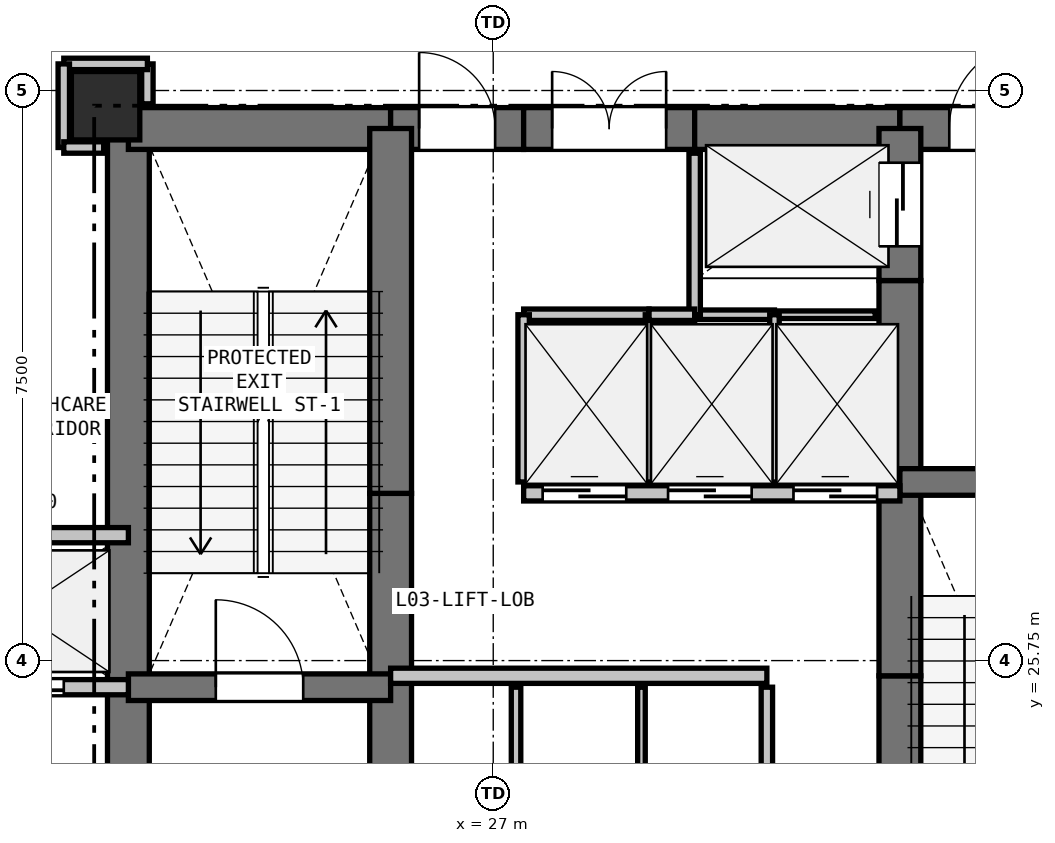
"""IFC4 building model, lengths in metres.
Left out: names, types, materials, properties, quantities, classifications, styles, units other than length and angle.
Written with IfcOpenShell. Run it as: python <this file> out.ifc"""

import sys

from ifc_helpers import new_model, si_unit, direction, frame, frame_2d, origin, origin_2d, place, context, subcontext, project, spatial, rectangle, extrude, element, fill, save


model = new_model("IFC4")
c1 = context("Model", 3, precision=1e-05, world=origin(), true_north=direction((0.0, 1.0)))
c2 = subcontext(c1, "Body", "Model", "MODEL_VIEW")
j1 = project(units=[si_unit("LENGTHUNIT", "METRE"), si_unit("PLANEANGLEUNIT", "RADIAN")], contexts=[c1])
p1 = place(None, origin())
s1 = spatial("IfcSite", under=j1, at=p1, CompositionType="ELEMENT")
p2 = place(p1, origin())
s2 = spatial("IfcBuilding", under=s1, at=p2, CompositionType="ELEMENT")
p3 = place(p2, frame((0.0, 0.0, 14.4)))
s3 = spatial("IfcBuildingStorey", under=s2, at=p3, CompositionType="ELEMENT", Elevation=14.4)
p4 = place(p3, frame((21.9, 33.05, 0.0), z_axis=(0.0, 0.0, 1.0), x_axis=(1.0, 0.0, 0.0)))
e1 = element("IfcColumn", 1, at=p4, inside=s3, PredefinedType="COLUMN", context=c2, shape_type="SweptSolid", body=[
    extrude(rectangle(XDim=0.9, YDim=0.9, at=origin_2d()), origin(), (0.0, 0.0, 1.0), 4.8),
])
p5 = place(p3, frame((22.2, 20.75, 0.0), z_axis=(0.0, 0.0, 1.0), x_axis=(0.0, 1.0, 0.0)))
e2 = element("IfcWall", 2, at=p5, inside=s3, PredefinedType="SHEAR", context=c2, shape_type="SweptSolid", body=[
    extrude(rectangle(XDim=4.65, YDim=0.55, at=frame_2d((2.325, 0.0))), origin(), (0.0, 0.0, 1.0), 4.52),
])
p6 = place(p3, frame((22.2, 25.4, 0.0), z_axis=(0.0, 0.0, 1.0), x_axis=(0.0, 1.0, 0.0)))
e3 = element("IfcWall", 3, at=p6, inside=s3, PredefinedType="SHEAR", context=c2, shape_type="SweptSolid", body=[
    extrude(rectangle(XDim=7.35, YDim=0.55, at=frame_2d((3.675, 0.0))), origin(), (0.0, 0.0, 1.0), 4.52),
])
p7 = place(p3, frame((22.2, 32.75, 0.0), z_axis=(0.0, 0.0, 1.0), x_axis=(1.0, 0.0, 0.0)))
e4 = element("IfcWall", 4, at=p7, inside=s3, PredefinedType="SHEAR", context=c2, shape_type="SweptSolid", body=[
    extrude(rectangle(XDim=3.45, YDim=0.55, at=frame_2d((1.725, 0.0))), origin(), (0.0, 0.0, 1.0), 4.52),
])
p8 = place(p3, frame((25.65, 32.75, 0.0), z_axis=(0.0, 0.0, 1.0), x_axis=(1.0, 0.0, 0.0)))
e5 = element("IfcWall", 5, at=p8, inside=s3, PredefinedType="SHEAR", context=c2, shape_type="SweptSolid", body=[
    extrude(rectangle(XDim=1.75, YDim=0.55, at=frame_2d((0.875, 0.0))), origin(), (0.0, 0.0, 1.0), 4.52),
])
p9 = place(p8, frame((0.375, 0.0, 0.0)))
e6 = element("IfcOpeningElement", 6, at=p9, cuts=e5, PredefinedType="OPENING", context=c2, shape_type="SweptSolid", body=[
    extrude(rectangle(XDim=1.0, YDim=2.15, at=frame_2d((0.5, 1.075))), frame((0.0, 0.285, 0.0), z_axis=(0.0, -1.0, 0.0), x_axis=(1.0, 0.0, 0.0)), (0.0, 0.0, 1.0), 0.57),
])
p10 = place(p3, frame((27.4, 32.75, 0.0), z_axis=(0.0, 0.0, 1.0), x_axis=(1.0, 0.0, 0.0)))
e7 = element("IfcWall", 7, at=p10, inside=s3, PredefinedType="SHEAR", context=c2, shape_type="SweptSolid", body=[
    extrude(rectangle(XDim=2.25, YDim=0.55, at=frame_2d((1.125, 0.0))), origin(), (0.0, 0.0, 1.0), 4.52),
])
p11 = place(p10, frame((0.375, 0.0, 0.0)))
e8 = element("IfcOpeningElement", 8, at=p11, cuts=e7, PredefinedType="OPENING", context=c2, shape_type="SweptSolid", body=[
    extrude(rectangle(XDim=1.5, YDim=2.2, at=frame_2d((0.75, 1.1))), frame((0.0, 0.285, 0.0), z_axis=(0.0, -1.0, 0.0), x_axis=(1.0, 0.0, 0.0)), (0.0, 0.0, 1.0), 0.57),
])
p12 = place(p3, frame((29.65, 32.75, 0.0), z_axis=(0.0, 0.0, 1.0), x_axis=(1.0, 0.0, 0.0)))
e9 = element("IfcWall", 9, at=p12, inside=s3, PredefinedType="SHEAR", context=c2, shape_type="SweptSolid", body=[
    extrude(rectangle(XDim=2.7, YDim=0.55, at=frame_2d((1.35, 0.0))), origin(), (0.0, 0.0, 1.0), 4.52),
])
p13 = place(p3, frame((32.35, 32.75, 0.0), z_axis=(0.0, 0.0, 1.0), x_axis=(1.0, 0.0, 0.0)))
e10 = element("IfcWall", 10, at=p13, inside=s3, PredefinedType="SHEAR", context=c2, shape_type="SweptSolid", body=[
    extrude(rectangle(XDim=3.45, YDim=0.55, at=frame_2d((1.725, 0.0))), origin(), (0.0, 0.0, 1.0), 4.52),
])
p14 = place(p13, frame((0.65, 0.0, 0.0)))
e11 = element("IfcOpeningElement", 11, at=p14, cuts=e10, PredefinedType="OPENING", context=c2, shape_type="SweptSolid", body=[
    extrude(rectangle(XDim=1.15, YDim=2.15, at=frame_2d((0.575, 1.075))), frame((0.0, 0.285, 0.0), z_axis=(0.0, -1.0, 0.0), x_axis=(1.0, 0.0, 0.0)), (0.0, 0.0, 1.0), 0.57),
])
p15 = place(p3, frame((25.65, 22.75, 0.0), z_axis=(0.0, 0.0, 1.0), x_axis=(0.0, 1.0, 0.0)))
e12 = element("IfcWall", 12, at=p15, inside=s3, PredefinedType="SHEAR", context=c2, shape_type="SweptSolid", body=[
    extrude(rectangle(XDim=2.8, YDim=0.55, at=frame_2d((1.4, 0.0))), origin(), (0.0, 0.0, 1.0), 4.52),
])
p16 = place(p3, frame((25.65, 25.55, 0.0), z_axis=(0.0, 0.0, 1.0), x_axis=(0.0, 1.0, 0.0)))
e13 = element("IfcWall", 13, at=p16, inside=s3, PredefinedType="SHEAR", context=c2, shape_type="SweptSolid", body=[
    extrude(rectangle(XDim=2.4, YDim=0.55, at=frame_2d((1.2, 0.0))), origin(), (0.0, 0.0, 1.0), 4.52),
])
for number, where, z_axis, x_axis in (
    (14, (25.65, 27.95, 0.0), (0.0, 0.0, 1.0), (0.0, 1.0, 0.0)),
    (15, (32.35, 20.75, 0.0), (0.0, 0.0, 1.0), (0.0, 1.0, 0.0)),
):
    element("IfcWall", number, at=place(p3, frame(where, z_axis=z_axis, x_axis=x_axis)), inside=s3, PredefinedType="SHEAR", context=c2, shape_type="SweptSolid", body=[
        extrude(rectangle(XDim=4.8, YDim=0.55, at=frame_2d((2.4, 0.0))), origin(), (0.0, 0.0, 1.0), 4.52),
    ])
p17 = place(p3, frame((32.35, 25.55, 0.0), z_axis=(0.0, 0.0, 1.0), x_axis=(0.0, 1.0, 0.0)))
e16 = element("IfcWall", 16, at=p17, inside=s3, PredefinedType="SHEAR", context=c2, shape_type="SweptSolid", body=[
    extrude(rectangle(XDim=2.4, YDim=0.55, at=frame_2d((1.2, 0.0))), origin(), (0.0, 0.0, 1.0), 4.52),
])
p18 = place(p3, frame((32.35, 27.95, 0.0), z_axis=(0.0, 0.0, 1.0), x_axis=(0.0, 1.0, 0.0)))
e17 = element("IfcWall", 17, at=p18, inside=s3, PredefinedType="SHEAR", context=c2, shape_type="SweptSolid", body=[
    extrude(rectangle(XDim=2.8, YDim=0.55, at=frame_2d((1.4, 0.0))), origin(), (0.0, 0.0, 1.0), 4.52),
])
p19 = place(p3, frame((32.35, 30.75, 0.0), z_axis=(0.0, 0.0, 1.0), x_axis=(0.0, 1.0, 0.0)))
e18 = element("IfcWall", 18, at=p19, inside=s3, PredefinedType="SHEAR", context=c2, shape_type="SweptSolid", body=[
    extrude(rectangle(XDim=2.0, YDim=0.55, at=frame_2d((1.0, 0.0))), origin(), (0.0, 0.0, 1.0), 4.52),
])
p20 = place(p19, frame((0.45, 0.0, 0.0)))
e19 = element("IfcOpeningElement", 19, at=p20, cuts=e18, PredefinedType="OPENING", context=c2, shape_type="SweptSolid", body=[
    extrude(rectangle(XDim=1.1, YDim=2.15, at=frame_2d((0.55, 1.075))), frame((0.0, 0.285, 0.0), z_axis=(0.0, -1.0, 0.0), x_axis=(1.0, 0.0, 0.0)), (0.0, 0.0, 1.0), 0.57),
])
p21 = place(p3, frame((22.2, 25.4, 0.0), z_axis=(0.0, 0.0, 1.0), x_axis=(1.0, 0.0, 0.0)))
e20 = element("IfcWall", 20, at=p21, inside=s3, PredefinedType="SHEAR", context=c2, shape_type="SweptSolid", body=[
    extrude(rectangle(XDim=3.45, YDim=0.35, at=frame_2d((1.725, 0.0))), origin(), (0.0, 0.0, 1.0), 4.52),
])
p22 = place(p21, frame((1.15, 0.0, 0.0)))
e21 = element("IfcOpeningElement", 21, at=p22, cuts=e20, PredefinedType="OPENING", context=c2, shape_type="SweptSolid", body=[
    extrude(rectangle(XDim=1.15, YDim=2.15, at=frame_2d((0.575, 1.075))), frame((0.0, 0.185, 0.0), z_axis=(0.0, -1.0, 0.0), x_axis=(1.0, 0.0, 0.0)), (0.0, 0.0, 1.0), 0.37),
])
p23 = place(p3, frame((32.35, 28.1, 0.0), z_axis=(0.0, 0.0, 1.0), x_axis=(1.0, 0.0, 0.0)))
e22 = element("IfcWall", 22, at=p23, inside=s3, PredefinedType="SHEAR", context=c2, shape_type="SweptSolid", body=[
    extrude(rectangle(XDim=3.45, YDim=0.35, at=frame_2d((1.725, 0.0))), origin(), (0.0, 0.0, 1.0), 4.52),
])
p24 = place(p23, frame((1.15, 0.0, 0.0)))
e23 = element("IfcOpeningElement", 23, at=p24, cuts=e22, PredefinedType="OPENING", context=c2, shape_type="SweptSolid", body=[
    extrude(rectangle(XDim=1.15, YDim=2.15, at=frame_2d((0.575, 1.075))), frame((0.0, 0.185, 0.0), z_axis=(0.0, -1.0, 0.0), x_axis=(1.0, 0.0, 0.0)), (0.0, 0.0, 1.0), 0.37),
])
p25 = place(p3, frame((25.65, 25.55, 0.0), z_axis=(0.0, 0.0, 1.0), x_axis=(1.0, 0.0, 0.0)))
e24 = element("IfcWall", 24, at=p25, inside=s3, PredefinedType="PARTITIONING", context=c2, shape_type="SweptSolid", body=[
    extrude(rectangle(XDim=4.95, YDim=0.2, at=frame_2d((2.475, 0.0))), origin(), (0.0, 0.0, 1.0), 4.52),
])
p26 = place(p3, frame((27.4, 27.95, 0.0), z_axis=(0.0, 0.0, 1.0), x_axis=(1.0, 0.0, 0.0)))
e25 = element("IfcWall", 25, at=p26, inside=s3, PredefinedType="PARTITIONING", context=c2, shape_type="SweptSolid", body=[
    extrude(rectangle(XDim=4.95, YDim=0.2, at=frame_2d((2.475, 0.0))), origin(), (0.0, 0.0, 1.0), 4.52),
])
p27 = place(p26, frame((0.25, 0.0, 0.0)))
e26 = element("IfcOpeningElement", 26, at=p27, cuts=e25, PredefinedType="OPENING", context=c2, shape_type="SweptSolid", body=[
    extrude(rectangle(XDim=1.1, YDim=2.15, at=frame_2d((0.55, 1.075))), frame((0.0, 0.11, 0.0), z_axis=(0.0, -1.0, 0.0), x_axis=(1.0, 0.0, 0.0)), (0.0, 0.0, 1.0), 0.22),
])
p28 = place(p26, frame((1.9, 0.0, 0.0)))
e27 = element("IfcOpeningElement", 27, at=p28, cuts=e25, PredefinedType="OPENING", context=c2, shape_type="SweptSolid", body=[
    extrude(rectangle(XDim=1.1, YDim=2.15, at=frame_2d((0.55, 1.075))), frame((0.0, 0.11, 0.0), z_axis=(0.0, -1.0, 0.0), x_axis=(1.0, 0.0, 0.0)), (0.0, 0.0, 1.0), 0.22),
])
p29 = place(p26, frame((3.55, 0.0, 0.0)))
e28 = element("IfcOpeningElement", 28, at=p29, cuts=e25, PredefinedType="OPENING", context=c2, shape_type="SweptSolid", body=[
    extrude(rectangle(XDim=1.1, YDim=2.15, at=frame_2d((0.55, 1.075))), frame((0.0, 0.11, 0.0), z_axis=(0.0, -1.0, 0.0), x_axis=(1.0, 0.0, 0.0)), (0.0, 0.0, 1.0), 0.22),
])
p30 = place(p3, frame((19.4, 27.4, 0.0), z_axis=(0.0, 0.0, 1.0), x_axis=(1.0, 0.0, 0.0)))
e29 = element("IfcWall", 29, at=p30, inside=s3, PredefinedType="PARTITIONING", context=c2, shape_type="SweptSolid", body=[
    extrude(rectangle(XDim=2.8, YDim=0.2, at=frame_2d((1.4, 0.0))), origin(), (0.0, 0.0, 1.0), 3.969),
])
p31 = place(p3, frame((22.2, 25.4, 0.0), z_axis=(0.0, 0.0, 1.0), x_axis=(-1.0, 0.0, 0.0)))
e30 = element("IfcWall", 30, at=p31, inside=s3, PredefinedType="PARTITIONING", context=c2, shape_type="SweptSolid", body=[
    extrude(rectangle(XDim=2.8, YDim=0.2, at=frame_2d((1.4, 0.0))), origin(), (0.0, 0.0, 1.0), 3.969),
])
p32 = place(p31, frame((0.85, 0.0, 0.0)))
e31 = element("IfcOpeningElement", 31, at=p32, cuts=e30, PredefinedType="OPENING", context=c2, shape_type="SweptSolid", body=[
    extrude(rectangle(XDim=1.3, YDim=2.2, at=frame_2d((0.65, 1.1))), frame((0.0, 0.11, 0.0), z_axis=(0.0, -1.0, 0.0), x_axis=(1.0, 0.0, 0.0)), (0.0, 0.0, 1.0), 0.22),
])
p33 = place(p3, frame((32.025, 30.3, 0.0), z_axis=(0.0, 0.0, 1.0), x_axis=(-1.0, 0.0, 0.0)))
e32 = element("IfcWall", 32, at=p33, inside=s3, PredefinedType="PARTITIONING", context=c2, shape_type="SweptSolid", body=[
    extrude(rectangle(XDim=1.325, YDim=0.1, at=frame_2d((0.663, 0.0))), origin(), (0.0, 0.0, 1.0), 4.52),
])
p34 = place(p3, frame((30.7, 30.3, 0.0), z_axis=(0.0, 0.0, 1.0), x_axis=(-1.0, 0.0, 0.0)))
e33 = element("IfcWall", 33, at=p34, inside=s3, PredefinedType="PARTITIONING", context=c2, shape_type="SweptSolid", body=[
    extrude(rectangle(XDim=1.05, YDim=0.125, at=frame_2d((0.525, 0.0))), origin(), (0.0, 0.0, 1.0), 4.52),
])
p35 = place(p3, frame((29.65, 30.3, 0.0), z_axis=(0.0, 0.0, 1.0), x_axis=(0.0, 1.0, 0.0)))
e34 = element("IfcWall", 34, at=p35, inside=s3, PredefinedType="PARTITIONING", context=c2, shape_type="SweptSolid", body=[
    extrude(rectangle(XDim=2.125, YDim=0.15, at=frame_2d((1.062, 0.0))), origin(), (0.0, 0.0, 1.0), 4.52),
])
p36 = place(p3, frame((27.3, 25.4, 0.0), z_axis=(0.0, 0.0, 1.0), x_axis=(0.0, -1.0, 0.0)))
e35 = element("IfcWall", 35, at=p36, inside=s3, PredefinedType="PARTITIONING", context=c2, shape_type="SweptSolid", body=[
    extrude(rectangle(XDim=2.2, YDim=0.125, at=frame_2d((1.1, 0.0))), origin(), (0.0, 0.0, 1.0), 4.52),
])
p37 = place(p3, frame((28.95, 25.4, 0.0), z_axis=(0.0, 0.0, 1.0), x_axis=(0.0, -1.0, 0.0)))
e36 = element("IfcWall", 36, at=p37, inside=s3, PredefinedType="PARTITIONING", context=c2, shape_type="SweptSolid", body=[
    extrude(rectangle(XDim=2.2, YDim=0.1, at=frame_2d((1.1, 0.0))), origin(), (0.0, 0.0, 1.0), 4.52),
])
p38 = place(p3, frame((30.6, 25.4, 0.0), z_axis=(0.0, 0.0, 1.0), x_axis=(0.0, -1.0, 0.0)))
e37 = element("IfcWall", 37, at=p38, inside=s3, PredefinedType="PARTITIONING", context=c2, shape_type="SweptSolid", body=[
    extrude(rectangle(XDim=2.2, YDim=0.15, at=frame_2d((1.1, 0.0))), origin(), (0.0, 0.0, 1.0), 4.52),
])
p39 = place(p3, frame((27.4, 30.3, 0.0), z_axis=(0.0, 0.0, 1.0), x_axis=(1.0, 0.0, 0.0)))
e38 = element("IfcWall", 38, at=p39, inside=s3, PredefinedType="PARTITIONING", context=c2, shape_type="SweptSolid", body=[
    extrude(rectangle(XDim=1.65, YDim=0.15, at=frame_2d((0.825, 0.0))), origin(), (0.0, 0.0, 1.0), 4.52),
])
p40 = place(p3, frame((29.05, 30.3, 0.0), z_axis=(0.0, 0.0, 1.0), x_axis=(0.0, -1.0, 0.0)))
e39 = element("IfcWall", 39, at=p40, inside=s3, PredefinedType="PARTITIONING", context=c2, shape_type="SweptSolid", body=[
    extrude(rectangle(XDim=2.2, YDim=0.1, at=frame_2d((1.1, 0.0))), origin(), (0.0, 0.0, 1.0), 4.52),
])
p41 = place(p3, frame((27.4, 28.1, 0.0), z_axis=(0.0, 0.0, 1.0), x_axis=(0.0, 1.0, 0.0)))
e40 = element("IfcWall", 40, at=p41, inside=s3, PredefinedType="PARTITIONING", context=c2, shape_type="SweptSolid", body=[
    extrude(rectangle(XDim=2.2, YDim=0.15, at=frame_2d((1.1, 0.0))), origin(), (0.0, 0.0, 1.0), 4.52),
])
p42 = place(p3, frame((29.05, 30.3, 0.0), z_axis=(0.0, 0.0, 1.0), x_axis=(1.0, 0.0, 0.0)))
e41 = element("IfcWall", 41, at=p42, inside=s3, PredefinedType="PARTITIONING", context=c2, shape_type="SweptSolid", body=[
    extrude(rectangle(XDim=0.6, YDim=0.15, at=frame_2d((0.3, 0.0))), origin(), (0.0, 0.0, 1.0), 4.52),
])
p43 = place(p3, frame((30.7, 30.3, 0.0), z_axis=(0.0, 0.0, 1.0), x_axis=(0.0, -1.0, 0.0)))
e42 = element("IfcWall", 42, at=p43, inside=s3, PredefinedType="PARTITIONING", context=c2, shape_type="SweptSolid", body=[
    extrude(rectangle(XDim=2.2, YDim=0.125, at=frame_2d((1.1, 0.0))), origin(), (0.0, 0.0, 1.0), 4.52),
])
p44 = place(p3, frame((22.45, 33.075, 0.0), z_axis=(0.0, 0.0, 1.0), x_axis=(0.0, 1.0, 0.0)))
e43 = element("IfcWall", 43, at=p44, inside=s3, PredefinedType="PARTITIONING", context=c2, shape_type="SweptSolid", body=[
    extrude(rectangle(XDim=0.525, YDim=0.15, at=frame_2d((0.263, 0.0))), origin(), (0.0, 0.0, 1.0), 3.969),
])
p45 = place(p3, frame((22.45, 33.6, 0.0), z_axis=(0.0, 0.0, 1.0), x_axis=(-1.0, 0.0, 0.0)))
e44 = element("IfcWall", 44, at=p45, inside=s3, PredefinedType="PARTITIONING", context=c2, shape_type="SweptSolid", body=[
    extrude(rectangle(XDim=1.1, YDim=0.15, at=frame_2d((0.55, 0.0))), origin(), (0.0, 0.0, 1.0), 4.52),
])
p46 = place(p3, frame((21.35, 33.6, 0.0), z_axis=(0.0, 0.0, 1.0), x_axis=(0.0, -1.0, 0.0)))
e45 = element("IfcWall", 45, at=p46, inside=s3, PredefinedType="PARTITIONING", context=c2, shape_type="SweptSolid", body=[
    extrude(rectangle(XDim=1.1, YDim=0.15, at=frame_2d((0.55, 0.0))), origin(), (0.0, 0.0, 1.0), 3.818),
])
p47 = place(p3, frame((21.35, 32.5, 0.0), z_axis=(0.0, 0.0, 1.0), x_axis=(1.0, 0.0, 0.0)))
e46 = element("IfcWall", 46, at=p47, inside=s3, PredefinedType="PARTITIONING", context=c2, shape_type="SweptSolid", body=[
    extrude(rectangle(XDim=0.525, YDim=0.15, at=frame_2d((0.262, 0.0))), origin(), (0.0, 0.0, 1.0), 3.969),
])
p48 = place(p27, origin())
e47 = element("IfcDoor", 47, at=p48, inside=s3, OperationType="SLIDING_TO_LEFT", PredefinedType="DOOR", context=c2, shape_type="SweptSolid", body=[
    extrude(rectangle(XDim=1.1, YDim=2.15, at=frame_2d((0.55, 1.075))), frame((0.0, 0.025, 0.0), z_axis=(0.0, -1.0, 0.0), x_axis=(1.0, 0.0, 0.0)), (0.0, 0.0, 1.0), 0.05),
])
fill(e26, e47)
p49 = place(p28, origin())
e48 = element("IfcDoor", 48, at=p49, inside=s3, OperationType="SLIDING_TO_LEFT", PredefinedType="DOOR", context=c2, shape_type="SweptSolid", body=[
    extrude(rectangle(XDim=1.1, YDim=2.15, at=frame_2d((0.55, 1.075))), frame((0.0, 0.025, 0.0), z_axis=(0.0, -1.0, 0.0), x_axis=(1.0, 0.0, 0.0)), (0.0, 0.0, 1.0), 0.05),
])
fill(e27, e48)
p50 = place(p29, origin())
e49 = element("IfcDoor", 49, at=p50, inside=s3, OperationType="SLIDING_TO_LEFT", PredefinedType="DOOR", context=c2, shape_type="SweptSolid", body=[
    extrude(rectangle(XDim=1.1, YDim=2.15, at=frame_2d((0.55, 1.075))), frame((0.0, 0.025, 0.0), z_axis=(0.0, -1.0, 0.0), x_axis=(1.0, 0.0, 0.0)), (0.0, 0.0, 1.0), 0.05),
])
fill(e28, e49)
p51 = place(p9, origin())
e50 = element("IfcDoor", 50, at=p51, inside=s3, OperationType="SINGLE_SWING_LEFT", PredefinedType="DOOR", context=c2, shape_type="SweptSolid", body=[
    extrude(rectangle(XDim=1.0, YDim=2.15, at=frame_2d((0.5, 1.075))), frame((0.0, 0.025, 0.0), z_axis=(0.0, -1.0, 0.0), x_axis=(1.0, 0.0, 0.0)), (0.0, 0.0, 1.0), 0.05),
])
fill(e6, e50)
p52 = place(p20, origin())
e51 = element("IfcDoor", 51, at=p52, inside=s3, OperationType="SLIDING_TO_LEFT", PredefinedType="DOOR", context=c2, shape_type="SweptSolid", body=[
    extrude(rectangle(XDim=1.1, YDim=2.15, at=frame_2d((0.55, 1.075))), frame((0.0, 0.025, 0.0), z_axis=(0.0, -1.0, 0.0), x_axis=(1.0, 0.0, 0.0)), (0.0, 0.0, 1.0), 0.05),
])
fill(e19, e51)
p53 = place(p32, origin())
e52 = element("IfcDoor", 52, at=p53, inside=s3, OperationType="SLIDING_TO_LEFT", PredefinedType="DOOR", context=c2, shape_type="SweptSolid", body=[
    extrude(rectangle(XDim=1.3, YDim=2.2, at=frame_2d((0.65, 1.1))), frame((0.0, 0.025, 0.0), z_axis=(0.0, -1.0, 0.0), x_axis=(1.0, 0.0, 0.0)), (0.0, 0.0, 1.0), 0.05),
])
fill(e31, e52)
p54 = place(p22, origin())
e53 = element("IfcDoor", 53, at=p54, inside=s3, OperationType="SINGLE_SWING_LEFT", PredefinedType="DOOR", context=c2, shape_type="SweptSolid", body=[
    extrude(rectangle(XDim=1.15, YDim=2.15, at=frame_2d((0.575, 1.075))), frame((0.0, 0.025, 0.0), z_axis=(0.0, -1.0, 0.0), x_axis=(1.0, 0.0, 0.0)), (0.0, 0.0, 1.0), 0.05),
])
fill(e21, e53)
p55 = place(p14, origin())
e54 = element("IfcDoor", 54, at=p55, inside=s3, OperationType="SINGLE_SWING_RIGHT", PredefinedType="DOOR", context=c2, shape_type="SweptSolid", body=[
    extrude(rectangle(XDim=1.15, YDim=2.15, at=frame_2d((0.575, 1.075))), frame((0.0, 0.025, 0.0), z_axis=(0.0, -1.0, 0.0), x_axis=(1.0, 0.0, 0.0)), (0.0, 0.0, 1.0), 0.05),
])
fill(e11, e54)
p56 = place(p11, origin())
e55 = element("IfcDoor", 55, at=p56, inside=s3, OperationType="DOUBLE_DOOR_SINGLE_SWING", PredefinedType="DOOR", context=c2, shape_type="SweptSolid", body=[
    extrude(rectangle(XDim=1.5, YDim=2.2, at=frame_2d((0.75, 1.1))), frame((0.0, 0.025, 0.0), z_axis=(0.0, -1.0, 0.0), x_axis=(1.0, 0.0, 0.0)), (0.0, 0.0, 1.0), 0.05),
])
fill(e8, e55)
save(model, sys.argv[1])
